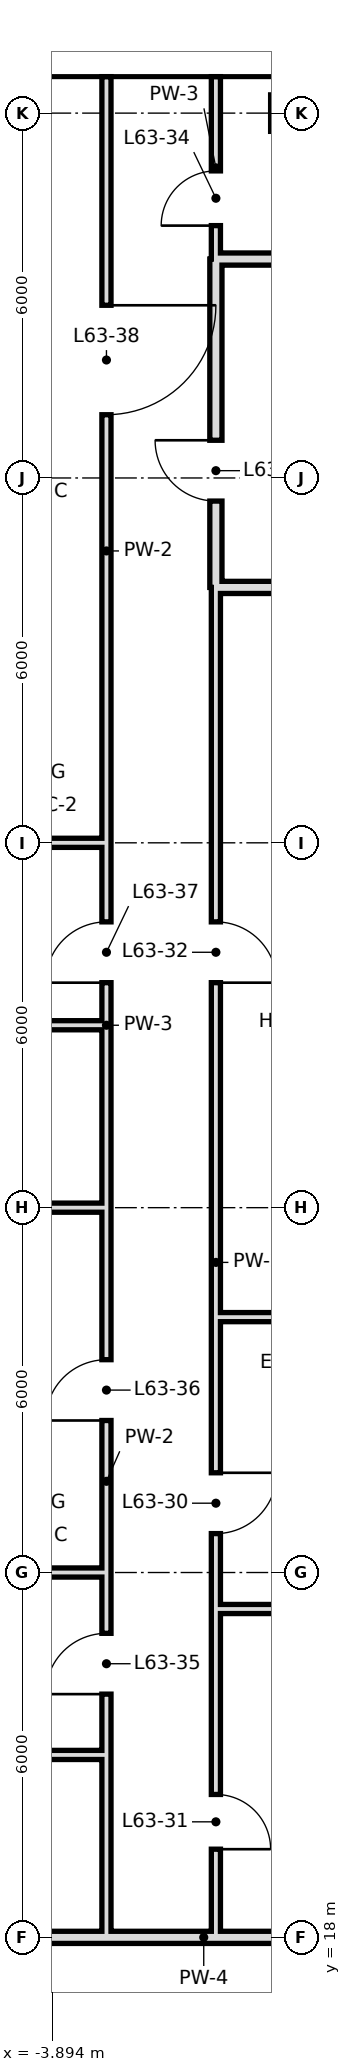
"""IFC4 building model, lengths in metres.
Left out: names, types, materials, properties, quantities, classifications, styles, units other than length and angle.
Written with IfcOpenShell. Run it as: python <this file> out.ifc"""

import sys

from ifc_helpers import new_model, si_unit, direction, frame, frame_2d, origin, place, context, subcontext, project, spatial, rectangle, extrude, element, fill, save


model = new_model("IFC4")
c1 = context("Model", 3, precision=1e-05, world=origin(), true_north=direction((0.0, 1.0)))
c2 = subcontext(c1, "Body", "Model", "MODEL_VIEW")
j1 = project(units=[si_unit("LENGTHUNIT", "METRE"), si_unit("PLANEANGLEUNIT", "RADIAN")], contexts=[c1])
p1 = place(None, origin())
s1 = spatial("IfcSite", under=j1, at=p1, CompositionType="ELEMENT")
p2 = place(p1, origin())
s2 = spatial("IfcBuilding", under=s1, at=p2, CompositionType="ELEMENT")
p3 = place(p2, frame((0.0, 0.0, 266.6)))
s3 = spatial("IfcBuildingStorey", under=s2, at=p3, CompositionType="ELEMENT", Elevation=266.6)
p4 = place(p3, frame((-1.2, 40.2, 0.0), z_axis=(0.0, 0.0, 1.0), x_axis=(0.0, 1.0, 0.0)))
e1 = element("IfcWall", 1, at=p4, inside=s3, PredefinedType="SOLIDWALL", context=c2, shape_type="SweptSolid", body=[
    extrude(rectangle(XDim=5.4, YDim=0.2, at=frame_2d((2.7, 0.0))), origin(), (0.0, 0.0, 1.0), 2.72),
])
p5 = place(p4, frame((1.42, 0.0, 0.0)))
e2 = element("IfcOpeningElement", 2, at=p5, cuts=e1, PredefinedType="OPENING", context=c2, shape_type="SweptSolid", body=[
    extrude(rectangle(XDim=1.0, YDim=2.4, at=frame_2d((0.5, 1.2))), frame((0.0, 0.11, 0.0), z_axis=(0.0, -1.0, 0.0), x_axis=(1.0, 0.0, 0.0)), (0.0, 0.0, 1.0), 0.22),
])
p6 = place(p3, frame((-1.2, 18.0, 0.0), z_axis=(0.0, 0.0, 1.0), x_axis=(0.0, 1.0, 0.0)))
e3 = element("IfcWall", 3, at=p6, inside=s3, PredefinedType="PARTITIONING", context=c2, shape_type="SweptSolid", body=[
    extrude(rectangle(XDim=22.2, YDim=0.15, at=frame_2d((11.1, 0.0))), origin(), (0.0, 0.0, 1.0), 3.42),
])
p7 = place(p6, frame((6.64, 0.0, 0.0)))
e4 = element("IfcOpeningElement", 4, at=p7, cuts=e3, PredefinedType="OPENING", context=c2, shape_type="SweptSolid", body=[
    extrude(rectangle(XDim=1.0, YDim=2.4, at=frame_2d((0.5, 1.2))), frame((0.0, 0.085, 0.0), z_axis=(0.0, -1.0, 0.0), x_axis=(1.0, 0.0, 0.0)), (0.0, 0.0, 1.0), 0.17),
])
p8 = place(p6, frame((1.45, 0.0, 0.0)))
e5 = element("IfcOpeningElement", 5, at=p8, cuts=e3, PredefinedType="OPENING", context=c2, shape_type="SweptSolid", body=[
    extrude(rectangle(XDim=0.9, YDim=2.1, at=frame_2d((0.45, 1.05))), frame((0.0, 0.085, 0.0), z_axis=(0.0, -1.0, 0.0), x_axis=(1.0, 0.0, 0.0)), (0.0, 0.0, 1.0), 0.17),
])
p9 = place(p6, frame((15.7, 0.0, 0.0)))
e6 = element("IfcOpeningElement", 6, at=p9, cuts=e3, PredefinedType="OPENING", context=c2, shape_type="SweptSolid", body=[
    extrude(rectangle(XDim=1.0, YDim=2.4, at=frame_2d((0.5, 1.2))), frame((0.0, 0.085, 0.0), z_axis=(0.0, -1.0, 0.0), x_axis=(1.0, 0.0, 0.0)), (0.0, 0.0, 1.0), 0.17),
])
p10 = place(p3, frame((-1.2, 45.6, 0.0), z_axis=(0.0, 0.0, 1.0), x_axis=(0.0, 1.0, 0.0)))
e7 = element("IfcWall", 7, at=p10, inside=s3, PredefinedType="PARTITIONING", context=c2, shape_type="SweptSolid", body=[
    extrude(rectangle(XDim=3.0, YDim=0.15, at=frame_2d((1.5, 0.0))), origin(), (0.0, 0.0, 1.0), 3.42),
])
p11 = place(p10, frame((0.55, 0.0, 0.0)))
e8 = element("IfcOpeningElement", 8, at=p11, cuts=e7, PredefinedType="OPENING", context=c2, shape_type="SweptSolid", body=[
    extrude(rectangle(XDim=0.9, YDim=2.4, at=frame_2d((0.45, 1.2))), frame((0.0, 0.085, 0.0), z_axis=(0.0, -1.0, 0.0), x_axis=(1.0, 0.0, 0.0)), (0.0, 0.0, 1.0), 0.17),
])
p12 = place(p3, frame((-3.0, 21.0, 0.0), z_axis=(0.0, 0.0, 1.0), x_axis=(0.0, 1.0, 0.0)))
e9 = element("IfcWall", 9, at=p12, inside=s3, PredefinedType="PARTITIONING", context=c2, shape_type="SweptSolid", body=[
    extrude(rectangle(XDim=9.0, YDim=0.15, at=frame_2d((4.5, 0.0))), origin(), (0.0, 0.0, 1.0), 3.42),
])
p13 = place(p12, frame((1.0, 0.0, 0.0)))
e10 = element("IfcOpeningElement", 10, at=p13, cuts=e9, PredefinedType="OPENING", context=c2, shape_type="SweptSolid", body=[
    extrude(rectangle(XDim=1.0, YDim=2.4, at=frame_2d((0.5, 1.2))), frame((0.0, 0.085, 0.0), z_axis=(0.0, -1.0, 0.0), x_axis=(1.0, 0.0, 0.0)), (0.0, 0.0, 1.0), 0.17),
])
p14 = place(p12, frame((5.5, 0.0, 0.0)))
e11 = element("IfcOpeningElement", 11, at=p14, cuts=e9, PredefinedType="OPENING", context=c2, shape_type="SweptSolid", body=[
    extrude(rectangle(XDim=1.0, YDim=2.4, at=frame_2d((0.5, 1.2))), frame((0.0, 0.085, 0.0), z_axis=(0.0, -1.0, 0.0), x_axis=(1.0, 0.0, 0.0)), (0.0, 0.0, 1.0), 0.17),
])
p15 = place(p3, frame((-3.0, 33.0, 0.0), z_axis=(0.0, 0.0, 1.0), x_axis=(0.0, 1.0, 0.0)))
e12 = element("IfcWall", 12, at=p15, inside=s3, PredefinedType="PARTITIONING", context=c2, shape_type="SweptSolid", body=[
    extrude(rectangle(XDim=15.6, YDim=0.15, at=frame_2d((7.8, 0.0))), origin(), (0.0, 0.0, 1.0), 3.42),
])
p16 = place(p15, frame((0.7, 0.0, 0.0)))
e13 = element("IfcOpeningElement", 13, at=p16, cuts=e12, PredefinedType="OPENING", context=c2, shape_type="SweptSolid", body=[
    extrude(rectangle(XDim=1.0, YDim=2.4, at=frame_2d((0.5, 1.2))), frame((0.0, 0.085, 0.0), z_axis=(0.0, -1.0, 0.0), x_axis=(1.0, 0.0, 0.0)), (0.0, 0.0, 1.0), 0.17),
])
p17 = place(p15, frame((10.04, 0.0, 0.0)))
e14 = element("IfcOpeningElement", 14, at=p17, cuts=e12, PredefinedType="OPENING", context=c2, shape_type="SweptSolid", body=[
    extrude(rectangle(XDim=1.8, YDim=2.4, at=frame_2d((0.9, 1.2))), frame((0.0, 0.085, 0.0), z_axis=(0.0, -1.0, 0.0), x_axis=(1.0, 0.0, 0.0)), (0.0, 0.0, 1.0), 0.17),
])
for number, where, z_axis, x_axis in (
    (15, (-3.0, 18.0, 0.0), (0.0, 0.0, 1.0), (0.0, 1.0, 0.0)),
    (16, (-3.0, 30.0, 0.0), (0.0, 0.0, 1.0), (0.0, 1.0, 0.0)),
):
    element("IfcWall", number, at=place(p3, frame(where, z_axis=z_axis, x_axis=x_axis)), inside=s3, PredefinedType="PARTITIONING", context=c2, shape_type="SweptSolid", body=[
        extrude(rectangle(XDim=3.0, YDim=0.15, at=frame_2d((1.5, 0.0))), origin(), (0.0, 0.0, 1.0), 3.42),
    ])
p18 = place(p3, frame((-6.6, 18.0, 0.0), z_axis=(0.0, 0.0, 1.0), x_axis=(1.0, 0.0, 0.0)))
e17 = element("IfcWall", 17, at=p18, inside=s3, PredefinedType="SOLIDWALL", context=c2, shape_type="SweptSolid", body=[
    extrude(rectangle(XDim=9.7, YDim=0.2, at=frame_2d((4.85, 0.0))), origin(), (0.0, 0.0, 1.0), 2.72),
])
p19 = place(p3, frame((-6.0, 21.0, 0.0), z_axis=(0.0, 0.0, 1.0), x_axis=(1.0, 0.0, 0.0)))
e18 = element("IfcWall", 18, at=p19, inside=s3, PredefinedType="PARTITIONING", context=c2, shape_type="SweptSolid", body=[
    extrude(rectangle(XDim=3.0, YDim=0.15, at=frame_2d((1.5, 0.0))), origin(), (0.0, 0.0, 1.0), 3.42),
])
p20 = place(p3, frame((-1.2, 23.4, 0.0), z_axis=(0.0, 0.0, 1.0), x_axis=(1.0, 0.0, 0.0)))
e19 = element("IfcWall", 19, at=p20, inside=s3, PredefinedType="PARTITIONING", context=c2, shape_type="SweptSolid", body=[
    extrude(rectangle(XDim=4.3, YDim=0.15, at=frame_2d((2.15, 0.0))), origin(), (0.0, 0.0, 1.0), 3.42),
])
p21 = place(p3, frame((-12.0, 24.0, 0.0), z_axis=(0.0, 0.0, 1.0), x_axis=(1.0, 0.0, 0.0)))
e20 = element("IfcWall", 20, at=p21, inside=s3, PredefinedType="PARTITIONING", context=c2, shape_type="SweptSolid", body=[
    extrude(rectangle(XDim=9.0, YDim=0.15, at=frame_2d((4.5, 0.0))), origin(), (0.0, 0.0, 1.0), 2.72),
])
p22 = place(p3, frame((-1.2, 28.2, 0.0), z_axis=(0.0, 0.0, 1.0), x_axis=(1.0, 0.0, 0.0)))
e21 = element("IfcWall", 21, at=p22, inside=s3, PredefinedType="PARTITIONING", context=c2, shape_type="SweptSolid", body=[
    extrude(rectangle(XDim=4.3, YDim=0.15, at=frame_2d((2.15, 0.0))), origin(), (0.0, 0.0, 1.0), 3.42),
])
p23 = place(p3, frame((-6.0, 30.0, 0.0), z_axis=(0.0, 0.0, 1.0), x_axis=(1.0, 0.0, 0.0)))
e22 = element("IfcWall", 22, at=p23, inside=s3, PredefinedType="PARTITIONING", context=c2, shape_type="SweptSolid", body=[
    extrude(rectangle(XDim=3.0, YDim=0.15, at=frame_2d((1.5, 0.0))), origin(), (0.0, 0.0, 1.0), 2.72),
])
p24 = place(p3, frame((-6.0, 33.0, 0.0), z_axis=(0.0, 0.0, 1.0), x_axis=(1.0, 0.0, 0.0)))
e23 = element("IfcWall", 23, at=p24, inside=s3, PredefinedType="PARTITIONING", context=c2, shape_type="SweptSolid", body=[
    extrude(rectangle(XDim=3.0, YDim=0.15, at=frame_2d((1.5, 0.0))), origin(), (0.0, 0.0, 1.0), 3.42),
])
p25 = place(p3, frame((-12.0, 36.0, 0.0), z_axis=(0.0, 0.0, 1.0), x_axis=(1.0, 0.0, 0.0)))
e24 = element("IfcWall", 24, at=p25, inside=s3, PredefinedType="PARTITIONING", context=c2, shape_type="SweptSolid", body=[
    extrude(rectangle(XDim=9.0, YDim=0.15, at=frame_2d((4.5, 0.0))), origin(), (0.0, 0.0, 1.0), 2.72),
])
for number, where, z_axis, x_axis in (
    (25, (-1.2, 40.2, 0.0), (0.0, 0.0, 1.0), (1.0, 0.0, 0.0)),
    (26, (-1.2, 45.6, 0.0), (0.0, 0.0, 1.0), (1.0, 0.0, 0.0)),
):
    element("IfcWall", number, at=place(p3, frame(where, z_axis=z_axis, x_axis=x_axis)), inside=s3, PredefinedType="SOLIDWALL", context=c2, shape_type="SweptSolid", body=[
        extrude(rectangle(XDim=4.3, YDim=0.2, at=frame_2d((2.15, 0.0))), origin(), (0.0, 0.0, 1.0), 2.72),
    ])
p26 = place(p7, origin())
e27 = element("IfcDoor", 27, at=p26, inside=s3, OperationType="SINGLE_SWING_RIGHT", PredefinedType="DOOR", context=c2, shape_type="SweptSolid", body=[
    extrude(rectangle(XDim=1.0, YDim=2.4, at=frame_2d((0.5, 1.2))), frame((0.0, 0.025, 0.0), z_axis=(0.0, -1.0, 0.0), x_axis=(1.0, 0.0, 0.0)), (0.0, 0.0, 1.0), 0.05),
])
fill(e4, e27)
p27 = place(p8, frame((0.9, 0.0, 0.0), z_axis=(0.0, 0.0, 1.0), x_axis=(-1.0, 0.0, 0.0)))
e28 = element("IfcDoor", 28, at=p27, inside=s3, OperationType="SINGLE_SWING_RIGHT", PredefinedType="DOOR", context=c2, shape_type="SweptSolid", body=[
    extrude(rectangle(XDim=0.9, YDim=2.1, at=frame_2d((0.45, 1.05))), frame((0.0, 0.025, 0.0), z_axis=(0.0, -1.0, 0.0), x_axis=(1.0, 0.0, 0.0)), (0.0, 0.0, 1.0), 0.05),
])
fill(e5, e28)
p28 = place(p9, frame((1.0, 0.0, 0.0), z_axis=(0.0, 0.0, 1.0), x_axis=(-1.0, 0.0, 0.0)))
e29 = element("IfcDoor", 29, at=p28, inside=s3, OperationType="SINGLE_SWING_RIGHT", PredefinedType="DOOR", context=c2, shape_type="SweptSolid", body=[
    extrude(rectangle(XDim=1.0, YDim=2.4, at=frame_2d((0.5, 1.2))), frame((0.0, 0.025, 0.0), z_axis=(0.0, -1.0, 0.0), x_axis=(1.0, 0.0, 0.0)), (0.0, 0.0, 1.0), 0.05),
])
fill(e6, e29)
p29 = place(p5, frame((1.0, 0.0, 0.0), z_axis=(0.0, 0.0, 1.0), x_axis=(-1.0, 0.0, 0.0)))
e30 = element("IfcDoor", 30, at=p29, inside=s3, OperationType="SINGLE_SWING_LEFT", PredefinedType="DOOR", context=c2, shape_type="SweptSolid", body=[
    extrude(rectangle(XDim=1.0, YDim=2.4, at=frame_2d((0.5, 1.2))), frame((0.0, 0.025, 0.0), z_axis=(0.0, -1.0, 0.0), x_axis=(1.0, 0.0, 0.0)), (0.0, 0.0, 1.0), 0.05),
])
fill(e2, e30)
p30 = place(p11, origin())
e31 = element("IfcDoor", 31, at=p30, inside=s3, OperationType="SINGLE_SWING_LEFT", PredefinedType="DOOR", context=c2, shape_type="SweptSolid", body=[
    extrude(rectangle(XDim=0.9, YDim=2.4, at=frame_2d((0.45, 1.2))), frame((0.0, 0.025, 0.0), z_axis=(0.0, -1.0, 0.0), x_axis=(1.0, 0.0, 0.0)), (0.0, 0.0, 1.0), 0.05),
])
fill(e8, e31)
p31 = place(p13, origin())
e32 = element("IfcDoor", 32, at=p31, inside=s3, OperationType="SINGLE_SWING_LEFT", PredefinedType="DOOR", context=c2, shape_type="SweptSolid", body=[
    extrude(rectangle(XDim=1.0, YDim=2.4, at=frame_2d((0.5, 1.2))), frame((0.0, 0.025, 0.0), z_axis=(0.0, -1.0, 0.0), x_axis=(1.0, 0.0, 0.0)), (0.0, 0.0, 1.0), 0.05),
])
fill(e10, e32)
p32 = place(p14, origin())
e33 = element("IfcDoor", 33, at=p32, inside=s3, OperationType="SINGLE_SWING_LEFT", PredefinedType="DOOR", context=c2, shape_type="SweptSolid", body=[
    extrude(rectangle(XDim=1.0, YDim=2.4, at=frame_2d((0.5, 1.2))), frame((0.0, 0.025, 0.0), z_axis=(0.0, -1.0, 0.0), x_axis=(1.0, 0.0, 0.0)), (0.0, 0.0, 1.0), 0.05),
])
fill(e11, e33)
p33 = place(p16, origin())
e34 = element("IfcDoor", 34, at=p33, inside=s3, OperationType="SINGLE_SWING_LEFT", PredefinedType="DOOR", context=c2, shape_type="SweptSolid", body=[
    extrude(rectangle(XDim=1.0, YDim=2.4, at=frame_2d((0.5, 1.2))), frame((0.0, 0.025, 0.0), z_axis=(0.0, -1.0, 0.0), x_axis=(1.0, 0.0, 0.0)), (0.0, 0.0, 1.0), 0.05),
])
fill(e13, e34)
p34 = place(p17, origin())
e35 = element("IfcDoor", 35, at=p34, inside=s3, OperationType="SINGLE_SWING_RIGHT", PredefinedType="DOOR", context=c2, shape_type="SweptSolid", body=[
    extrude(rectangle(XDim=1.8, YDim=2.4, at=frame_2d((0.9, 1.2))), frame((0.0, 0.025, 0.0), z_axis=(0.0, -1.0, 0.0), x_axis=(1.0, 0.0, 0.0)), (0.0, 0.0, 1.0), 0.05),
])
fill(e14, e35)
save(model, sys.argv[1])
